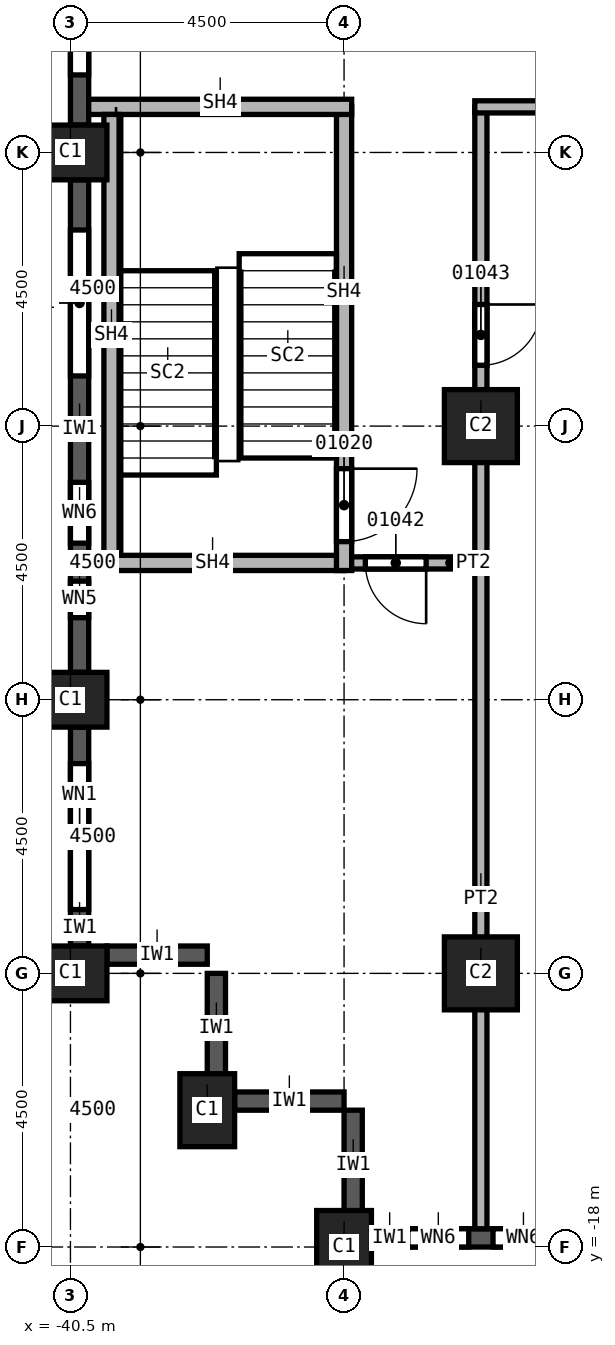
"""IFC4 building model, lengths in metres.
Left out: names, types, materials, properties, quantities, classifications, styles, units other than length and angle.
Written with IfcOpenShell. Run it as: python <this file> out.ifc"""

import sys

from ifc_helpers import new_model, si_unit, direction, frame, frame_2d, origin, origin_2d, place, context, subcontext, project, spatial, rectangle, extrude, element, fill, save


model = new_model("IFC4")
c1 = context("Model", 3, precision=1e-05, world=origin(), true_north=direction((0.0, 1.0)))
c2 = subcontext(c1, "Body", "Model", "MODEL_VIEW")
j1 = project(units=[si_unit("LENGTHUNIT", "METRE"), si_unit("PLANEANGLEUNIT", "RADIAN")], contexts=[c1])
p1 = place(None, origin())
s1 = spatial("IfcSite", under=j1, at=p1, CompositionType="ELEMENT")
p2 = place(p1, origin())
s2 = spatial("IfcBuilding", under=s1, at=p2, CompositionType="ELEMENT")
p3 = place(p2, frame((0.0, 0.0, 72.0)))
s3 = spatial("IfcBuildingStorey", under=s2, at=p3, CompositionType="ELEMENT", Elevation=72.0)
for number, where, z_axis, x_axis in (
    (1, (-40.5, 0.0, 0.0), (0.0, 0.0, 1.0), (0.0, 1.0, 0.0)),
    (2, (-40.5, -9.0, 0.0), (0.0, 0.0, 1.0), (0.0, 1.0, 0.0)),
    (3, (-40.5, -13.5, 0.0), (0.0, 0.0, 1.0), (0.0, 1.0, 0.0)),
    (4, (-38.25, -15.75, 0.0), (0.0, 0.0, 1.0), (1.0, 0.0, 0.0)),
    (5, (-36.0, -18.0, 0.0), (0.0, 0.0, 1.0), (1.0, 0.0, 0.0)),
):
    element("IfcColumn", number, at=place(p3, frame(where, z_axis=z_axis, x_axis=x_axis)), inside=s3, PredefinedType="COLUMN", context=c2, shape_type="SweptSolid", body=[
        extrude(rectangle(XDim=0.9, YDim=1.2, at=origin_2d()), origin(), (0.0, 0.0, 1.0), 3.7),
    ])
for number, where, z_axis, x_axis in (
    (6, (-33.75, -4.5, 0.0), (0.0, 0.0, 1.0), (1.0, 0.0, 0.0)),
    (7, (-33.75, -13.5, 0.0), (0.0, 0.0, 1.0), (1.0, 0.0, 0.0)),
):
    element("IfcColumn", number, at=place(p3, frame(where, z_axis=z_axis, x_axis=x_axis)), inside=s3, PredefinedType="COLUMN", context=c2, shape_type="SweptSolid", body=[
        extrude(rectangle(XDim=1.2, YDim=1.2, at=origin_2d()), origin(), (0.0, 0.0, 1.0), 3.7),
    ])
p4 = place(p3, frame((-39.9, -13.2, 0.0), z_axis=(0.0, 0.0, 1.0), x_axis=(1.0, 0.0, 0.0)))
e8 = element("IfcWall", 8, at=p4, inside=s3, PredefinedType="SOLIDWALL", context=c2, shape_type="SweptSolid", body=[
    extrude(rectangle(XDim=1.65, YDim=0.3, at=frame_2d((0.825, 0.0))), origin(), (0.0, 0.0, 1.0), 3.1),
])
for number, where, z_axis, x_axis in (
    (9, (-38.1, -15.3, 0.0), (0.0, 0.0, 1.0), (0.0, 1.0, 0.0)),
    (10, (-37.8, -15.6, 0.0), (0.0, 0.0, 1.0), (1.0, 0.0, 0.0)),
    (11, (-35.85, -17.55, 0.0), (0.0, 0.0, 1.0), (0.0, 1.0, 0.0)),
):
    element("IfcWall", number, at=place(p3, frame(where, z_axis=z_axis, x_axis=x_axis)), inside=s3, PredefinedType="SOLIDWALL", context=c2, shape_type="SweptSolid", body=[
        extrude(rectangle(XDim=1.8, YDim=0.3, at=frame_2d((0.9, 0.0))), origin(), (0.0, 0.0, 1.0), 3.1),
    ])
p5 = place(p3, frame((-40.35, 8.55, 0.0), z_axis=(0.0, 0.0, 1.0), x_axis=(0.0, -1.0, 0.0)))
e12 = element("IfcWall", 12, at=p5, inside=s3, PredefinedType="SOLIDWALL", context=c2, shape_type="SweptSolid", body=[
    extrude(rectangle(XDim=8.1, YDim=0.3, at=frame_2d((4.05, 0.0))), origin(), (0.0, 0.0, 1.0), 3.1),
])
p6 = place(p5, frame((0.825, 0.0, 0.8)))
e13 = element("IfcOpeningElement", 13, at=p6, cuts=e12, PredefinedType="OPENING", context=c2, shape_type="SweptSolid", body=[
    extrude(rectangle(XDim=2.4, YDim=1.95, at=frame_2d((1.2, 0.975))), frame((0.0, 0.15, 0.0), z_axis=(0.0, -1.0, 0.0), x_axis=(1.0, 0.0, 0.0)), (0.0, 0.0, 1.0), 0.3),
])
p7 = place(p5, frame((4.875, 0.0, 0.8)))
e14 = element("IfcOpeningElement", 14, at=p7, cuts=e12, PredefinedType="OPENING", context=c2, shape_type="SweptSolid", body=[
    extrude(rectangle(XDim=2.4, YDim=1.95, at=frame_2d((1.2, 0.975))), frame((0.0, 0.15, 0.0), z_axis=(0.0, -1.0, 0.0), x_axis=(1.0, 0.0, 0.0)), (0.0, 0.0, 1.0), 0.3),
])
p8 = place(p3, frame((-40.35, -0.45, 0.0), z_axis=(0.0, 0.0, 1.0), x_axis=(0.0, -1.0, 0.0)))
e15 = element("IfcWall", 15, at=p8, inside=s3, PredefinedType="SOLIDWALL", context=c2, shape_type="SweptSolid", body=[
    extrude(rectangle(XDim=8.1, YDim=0.3, at=frame_2d((4.05, 0.0))), origin(), (0.0, 0.0, 1.0), 3.1),
])
p9 = place(p8, frame((0.825, 0.0, 0.8)))
e16 = element("IfcOpeningElement", 16, at=p9, cuts=e15, PredefinedType="OPENING", context=c2, shape_type="SweptSolid", body=[
    extrude(rectangle(XDim=2.4, YDim=1.95, at=frame_2d((1.2, 0.975))), frame((0.0, 0.15, 0.0), z_axis=(0.0, -1.0, 0.0), x_axis=(1.0, 0.0, 0.0)), (0.0, 0.0, 1.0), 0.3),
])
p10 = place(p8, frame((4.975, 0.0, 0.8)))
e17 = element("IfcOpeningElement", 17, at=p10, cuts=e15, PredefinedType="OPENING", context=c2, shape_type="SweptSolid", body=[
    extrude(rectangle(XDim=1.0, YDim=1.95, at=frame_2d((0.5, 0.975))), frame((0.0, 0.15, 0.0), z_axis=(0.0, -1.0, 0.0), x_axis=(1.0, 0.0, 0.0)), (0.0, 0.0, 1.0), 0.3),
])
p11 = place(p8, frame((6.6, 0.0, 0.8)))
e18 = element("IfcOpeningElement", 18, at=p11, cuts=e15, PredefinedType="OPENING", context=c2, shape_type="SweptSolid", body=[
    extrude(rectangle(XDim=0.6, YDim=1.95, at=frame_2d((0.3, 0.975))), frame((0.0, 0.15, 0.0), z_axis=(0.0, -1.0, 0.0), x_axis=(1.0, 0.0, 0.0)), (0.0, 0.0, 1.0), 0.3),
])
p12 = place(p3, frame((-40.35, -9.45, 0.0), z_axis=(0.0, 0.0, 1.0), x_axis=(0.0, -1.0, 0.0)))
e19 = element("IfcWall", 19, at=p12, inside=s3, PredefinedType="SOLIDWALL", context=c2, shape_type="SweptSolid", body=[
    extrude(rectangle(XDim=3.6, YDim=0.3, at=frame_2d((1.8, 0.0))), origin(), (0.0, 0.0, 1.0), 3.1),
])
p13 = place(p12, frame((0.6, 0.0, 0.8)))
e20 = element("IfcOpeningElement", 20, at=p13, cuts=e19, PredefinedType="OPENING", context=c2, shape_type="SweptSolid", body=[
    extrude(rectangle(XDim=2.4, YDim=1.95, at=frame_2d((1.2, 0.975))), frame((0.0, 0.15, 0.0), z_axis=(0.0, -1.0, 0.0), x_axis=(1.0, 0.0, 0.0)), (0.0, 0.0, 1.0), 0.3),
])
p14 = place(p3, frame((-35.55, -17.85, 0.0), z_axis=(0.0, 0.0, 1.0), x_axis=(1.0, 0.0, 0.0)))
e21 = element("IfcWall", 21, at=p14, inside=s3, PredefinedType="SOLIDWALL", context=c2, shape_type="SweptSolid", body=[
    extrude(rectangle(XDim=3.6, YDim=0.3, at=frame_2d((1.8, 0.0))), origin(), (0.0, 0.0, 1.0), 3.1),
])
p15 = place(p14, frame((0.6, 0.0, 0.8)))
e22 = element("IfcOpeningElement", 22, at=p15, cuts=e21, PredefinedType="OPENING", context=c2, shape_type="SweptSolid", body=[
    extrude(rectangle(XDim=1.0, YDim=1.95, at=frame_2d((0.5, 0.975))), frame((0.0, 0.15, 0.0), z_axis=(0.0, -1.0, 0.0), x_axis=(1.0, 0.0, 0.0)), (0.0, 0.0, 1.0), 0.3),
])
p16 = place(p14, frame((2.0, 0.0, 0.8)))
e23 = element("IfcOpeningElement", 23, at=p16, cuts=e21, PredefinedType="OPENING", context=c2, shape_type="SweptSolid", body=[
    extrude(rectangle(XDim=1.0, YDim=1.95, at=frame_2d((0.5, 0.975))), frame((0.0, 0.15, 0.0), z_axis=(0.0, -1.0, 0.0), x_axis=(1.0, 0.0, 0.0)), (0.0, 0.0, 1.0), 0.3),
])
p17 = place(p3, frame((-33.75, 0.75, 0.0), z_axis=(0.0, 0.0, 1.0), x_axis=(0.0, -1.0, 0.0)))
e24 = element("IfcWall", 24, at=p17, inside=s3, PredefinedType="PARTITIONING", context=c2, shape_type="SweptSolid", body=[
    extrude(rectangle(XDim=18.45, YDim=0.2, at=frame_2d((9.225, 0.0))), origin(), (0.0, 0.0, 1.0), 3.7),
])
p18 = place(p17, frame((3.25, 0.0, 0.0)))
e25 = element("IfcOpeningElement", 25, at=p18, cuts=e24, PredefinedType="OPENING", context=c2, shape_type="SweptSolid", body=[
    extrude(rectangle(XDim=1.0, YDim=2.1, at=frame_2d((0.5, 1.05))), frame((0.0, 0.1, 0.0), z_axis=(0.0, -1.0, 0.0), x_axis=(1.0, 0.0, 0.0)), (0.0, 0.0, 1.0), 0.2),
])
p19 = place(p3, frame((-33.65, -6.75, 0.0), z_axis=(0.0, 0.0, 1.0), x_axis=(-1.0, 0.0, 0.0)))
e26 = element("IfcWall", 26, at=p19, inside=s3, PredefinedType="PARTITIONING", context=c2, shape_type="SweptSolid", body=[
    extrude(rectangle(XDim=2.35, YDim=0.2, at=frame_2d((1.175, 0.0))), origin(), (0.0, 0.0, 1.0), 3.7),
])
p20 = place(p19, frame((1.0, 0.0, 0.0)))
e27 = element("IfcOpeningElement", 27, at=p20, cuts=e26, PredefinedType="OPENING", context=c2, shape_type="SweptSolid", body=[
    extrude(rectangle(XDim=1.0, YDim=2.1, at=frame_2d((0.5, 1.05))), frame((0.0, 0.1, 0.0), z_axis=(0.0, -1.0, 0.0), x_axis=(1.0, 0.0, 0.0)), (0.0, 0.0, 1.0), 0.2),
])
p21 = place(p3, frame((-15.4, 0.75, 0.0), z_axis=(0.0, 0.0, 1.0), x_axis=(-1.0, 0.0, 0.0)))
e28 = element("IfcWall", 28, at=p21, inside=s3, PredefinedType="PARTITIONING", context=c2, shape_type="SweptSolid", body=[
    extrude(rectangle(XDim=18.45, YDim=0.2, at=frame_2d((9.225, 0.0))), origin(), (0.0, 0.0, 1.0), 3.7),
])
p22 = place(p3, frame((-36.0, -6.75, 0.0), z_axis=(0.0, 0.0, 1.0), x_axis=(-1.0, 0.0, 0.0)))
e29 = element("IfcWall", 29, at=p22, inside=s3, PredefinedType="SOLIDWALL", context=c2, shape_type="SweptSolid", body=[
    extrude(rectangle(XDim=4.2, YDim=0.25, at=frame_2d((2.1, 0.0))), origin(), (0.0, 0.0, 1.0), 3.7),
])
p23 = place(p3, frame((-36.0, 0.75, 0.0), z_axis=(0.0, 0.0, 1.0), x_axis=(0.0, -1.0, 0.0)))
e30 = element("IfcWall", 30, at=p23, inside=s3, PredefinedType="SOLIDWALL", context=c2, shape_type="SweptSolid", body=[
    extrude(rectangle(XDim=7.625, YDim=0.25, at=frame_2d((3.812, 0.0))), origin(), (0.0, 0.0, 1.0), 3.7),
])
p24 = place(p23, frame((5.95, 0.0, 0.0)))
e31 = element("IfcOpeningElement", 31, at=p24, cuts=e30, PredefinedType="OPENING", context=c2, shape_type="SweptSolid", body=[
    extrude(rectangle(XDim=1.2, YDim=2.1, at=frame_2d((0.6, 1.05))), frame((0.0, 0.125, 0.0), z_axis=(0.0, -1.0, 0.0), x_axis=(1.0, 0.0, 0.0)), (0.0, 0.0, 1.0), 0.25),
])
p25 = place(p3, frame((-35.875, 0.75, 0.0), z_axis=(0.0, 0.0, 1.0), x_axis=(-1.0, 0.0, 0.0)))
e32 = element("IfcWall", 32, at=p25, inside=s3, PredefinedType="SOLIDWALL", context=c2, shape_type="SweptSolid", body=[
    extrude(rectangle(XDim=4.325, YDim=0.25, at=frame_2d((2.163, 0.0))), origin(), (0.0, 0.0, 1.0), 3.7),
])
p26 = place(p3, frame((-39.825, -6.625, 0.0), z_axis=(0.0, 0.0, 1.0), x_axis=(0.0, 1.0, 0.0)))
e33 = element("IfcWall", 33, at=p26, inside=s3, PredefinedType="SOLIDWALL", context=c2, shape_type="SweptSolid", body=[
    extrude(rectangle(XDim=7.25, YDim=0.25, at=frame_2d((3.625, 0.0))), origin(), (0.0, 0.0, 1.0), 3.7),
])
p27 = place(p7, origin())
e34 = element("IfcWindow", 34, at=p27, inside=s3, PartitioningType="SINGLE_PANEL", PredefinedType="WINDOW", context=c2, shape_type="SweptSolid", body=[
    extrude(rectangle(XDim=2.4, YDim=1.95, at=frame_2d((1.2, 0.975))), frame((0.0, 0.03, 0.0), z_axis=(0.0, -1.0, 0.0), x_axis=(1.0, 0.0, 0.0)), (0.0, 0.0, 1.0), 0.06),
])
fill(e14, e34)
p28 = place(p9, origin())
e35 = element("IfcWindow", 35, at=p28, inside=s3, PartitioningType="SINGLE_PANEL", PredefinedType="WINDOW", context=c2, shape_type="SweptSolid", body=[
    extrude(rectangle(XDim=2.4, YDim=1.95, at=frame_2d((1.2, 0.975))), frame((0.0, 0.03, 0.0), z_axis=(0.0, -1.0, 0.0), x_axis=(1.0, 0.0, 0.0)), (0.0, 0.0, 1.0), 0.06),
])
fill(e16, e35)
p29 = place(p13, origin())
e36 = element("IfcWindow", 36, at=p29, inside=s3, PartitioningType="SINGLE_PANEL", PredefinedType="WINDOW", context=c2, shape_type="SweptSolid", body=[
    extrude(rectangle(XDim=2.4, YDim=1.95, at=frame_2d((1.2, 0.975))), frame((0.0, 0.03, 0.0), z_axis=(0.0, -1.0, 0.0), x_axis=(1.0, 0.0, 0.0)), (0.0, 0.0, 1.0), 0.06),
])
fill(e20, e36)
p30 = place(p24, origin())
e37 = element("IfcDoor", 37, at=p30, inside=s3, OperationType="SINGLE_SWING_LEFT", PredefinedType="DOOR", context=c2, shape_type="SweptSolid", body=[
    extrude(rectangle(XDim=1.2, YDim=2.1, at=frame_2d((0.6, 1.05))), frame((0.0, 0.025, 0.0), z_axis=(0.0, -1.0, 0.0), x_axis=(1.0, 0.0, 0.0)), (0.0, 0.0, 1.0), 0.05),
])
fill(e31, e37)
p31 = place(p20, origin())
e38 = element("IfcDoor", 38, at=p31, inside=s3, OperationType="SINGLE_SWING_LEFT", PredefinedType="DOOR", context=c2, shape_type="SweptSolid", body=[
    extrude(rectangle(XDim=1.0, YDim=2.1, at=frame_2d((0.5, 1.05))), frame((0.0, 0.025, 0.0), z_axis=(0.0, -1.0, 0.0), x_axis=(1.0, 0.0, 0.0)), (0.0, 0.0, 1.0), 0.05),
])
fill(e27, e38)
p32 = place(p18, origin())
e39 = element("IfcDoor", 39, at=p32, inside=s3, OperationType="SINGLE_SWING_RIGHT", PredefinedType="DOOR", context=c2, shape_type="SweptSolid", body=[
    extrude(rectangle(XDim=1.0, YDim=2.1, at=frame_2d((0.5, 1.05))), frame((0.0, 0.025, 0.0), z_axis=(0.0, -1.0, 0.0), x_axis=(1.0, 0.0, 0.0)), (0.0, 0.0, 1.0), 0.05),
])
fill(e25, e39)
p33 = place(p10, origin())
e40 = element("IfcWindow", 40, at=p33, inside=s3, PartitioningType="SINGLE_PANEL", PredefinedType="WINDOW", context=c2, shape_type="SweptSolid", body=[
    extrude(rectangle(XDim=1.0, YDim=1.95, at=frame_2d((0.5, 0.975))), frame((0.0, 0.03, 0.0), z_axis=(0.0, -1.0, 0.0), x_axis=(1.0, 0.0, 0.0)), (0.0, 0.0, 1.0), 0.06),
])
fill(e17, e40)
p34 = place(p11, origin())
e41 = element("IfcWindow", 41, at=p34, inside=s3, PartitioningType="SINGLE_PANEL", PredefinedType="WINDOW", context=c2, shape_type="SweptSolid", body=[
    extrude(rectangle(XDim=0.6, YDim=1.95, at=frame_2d((0.3, 0.975))), frame((0.0, 0.03, 0.0), z_axis=(0.0, -1.0, 0.0), x_axis=(1.0, 0.0, 0.0)), (0.0, 0.0, 1.0), 0.06),
])
fill(e18, e41)
p35 = place(p15, origin())
e42 = element("IfcWindow", 42, at=p35, inside=s3, PartitioningType="SINGLE_PANEL", PredefinedType="WINDOW", context=c2, shape_type="SweptSolid", body=[
    extrude(rectangle(XDim=1.0, YDim=1.95, at=frame_2d((0.5, 0.975))), frame((0.0, 0.03, 0.0), z_axis=(0.0, -1.0, 0.0), x_axis=(1.0, 0.0, 0.0)), (0.0, 0.0, 1.0), 0.06),
])
fill(e22, e42)
p36 = place(p16, origin())
e43 = element("IfcWindow", 43, at=p36, inside=s3, PartitioningType="SINGLE_PANEL", PredefinedType="WINDOW", context=c2, shape_type="SweptSolid", body=[
    extrude(rectangle(XDim=1.0, YDim=1.95, at=frame_2d((0.5, 0.975))), frame((0.0, 0.03, 0.0), z_axis=(0.0, -1.0, 0.0), x_axis=(1.0, 0.0, 0.0)), (0.0, 0.0, 1.0), 0.06),
])
fill(e23, e43)
save(model, sys.argv[1])
